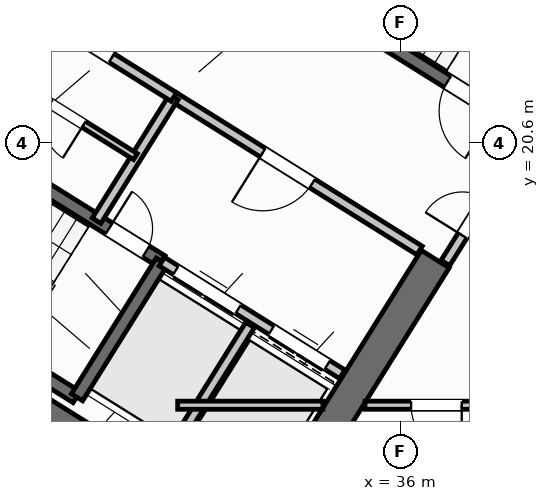
"""IFC4 building model, lengths in metres.
Left out: names, types, materials, properties, quantities, classifications, styles, units other than length and angle.
Written with IfcOpenShell. Run it as: python <this file> out.ifc"""

import sys

from ifc_helpers import new_model, si_unit, direction, frame, frame_2d, origin, place, context, subcontext, project, spatial, rectangle, extrude, source, transform, mapped, element, fill, save


model = new_model("IFC4")
c1 = context("Model", 3, precision=1e-05, world=origin(), true_north=direction((0.0, 1.0)))
c2 = subcontext(c1, "Body", "Model", "MODEL_VIEW")
j1 = project(units=[si_unit("LENGTHUNIT", "METRE"), si_unit("PLANEANGLEUNIT", "RADIAN")], contexts=[c1])
p1 = place(None, origin())
s1 = spatial("IfcSite", under=j1, at=p1, CompositionType="ELEMENT")
p2 = place(p1, origin())
s2 = spatial("IfcBuilding", under=s1, at=p2, CompositionType="ELEMENT")
p3 = place(p2, frame((0.0, 0.0, 42.0)))
s3 = spatial("IfcBuildingStorey", under=s2, at=p3, CompositionType="ELEMENT", Elevation=42.0)
p4 = place(p3, frame((33.409, 12.45, 0.0), z_axis=(0.0, 0.0, 1.0), x_axis=(-0.848051132073, 0.529914405721, 0.0)))
e1 = element("IfcWall", 1, at=p4, inside=s3, PredefinedType="SHEAR", context=c2, shape_type="SweptSolid", body=[
    extrude(rectangle(XDim=13.24, YDim=0.65, at=frame_2d((6.62, 0.0))), origin(), (0.0, 0.0, 1.0), 3.35),
])
p5 = place(p3, frame((36.683, 18.304, 0.0), z_axis=(0.0, 0.0, 1.0), x_axis=(-0.529899109053, -0.848060690178, 0.0)))
e2 = element("IfcWall", 2, at=p5, inside=s3, PredefinedType="SHEAR", context=c2, shape_type="SweptSolid", body=[
    extrude(rectangle(XDim=6.375, YDim=0.65, at=frame_2d((3.188, 0.0))), origin(), (0.0, 0.0, 1.0), 3.35),
])
p6 = place(p3, frame((29.268, 6.429, 0.0), z_axis=(0.0, 0.0, 1.0), x_axis=(-0.848049971435, 0.529916263149, 0.0)))
e3 = element("IfcWall", 3, at=p6, inside=s3, PredefinedType="STANDARD", context=c2, shape_type="SweptSolid", body=[
    extrude(rectangle(XDim=31.588, YDim=0.32, at=frame_2d((15.794, 0.0))), origin(), (0.0, 0.0, 1.0), 3.35),
])
p7 = place(p6, frame((16.362, 0.0, 0.0)))
e4 = element("IfcOpeningElement", 4, at=p7, cuts=e3, PredefinedType="OPENING", context=c2, shape_type="SweptSolid", body=[
    extrude(rectangle(XDim=1.2, YDim=2.15, at=frame_2d((0.6, 1.075))), frame((0.0, 0.17, 0.0), z_axis=(0.0, -1.0, 0.0), x_axis=(1.0, 0.0, 0.0)), (0.0, 0.0, 1.0), 0.34),
])
p8 = place(p6, frame((2.989, 0.0, 0.8)))
e5 = element("IfcOpeningElement", 5, at=p8, cuts=e3, PredefinedType="OPENING", context=c2, shape_type="SweptSolid", body=[
    extrude(rectangle(XDim=2.1, YDim=1.55, at=frame_2d((1.05, 0.775))), frame((0.0, 0.17, 0.0), z_axis=(0.0, -1.0, 0.0), x_axis=(1.0, 0.0, 0.0)), (0.0, 0.0, 1.0), 0.34),
])
p9 = place(p6, frame((8.359, 0.0, 0.8)))
e6 = element("IfcOpeningElement", 6, at=p9, cuts=e3, PredefinedType="OPENING", context=c2, shape_type="SweptSolid", body=[
    extrude(rectangle(XDim=2.1, YDim=1.55, at=frame_2d((1.05, 0.775))), frame((0.0, 0.17, 0.0), z_axis=(0.0, -1.0, 0.0), x_axis=(1.0, 0.0, 0.0)), (0.0, 0.0, 1.0), 0.34),
])
p10 = place(p6, frame((13.284, 0.0, 0.95)))
e7 = element("IfcOpeningElement", 7, at=p10, cuts=e3, PredefinedType="OPENING", context=c2, shape_type="SweptSolid", body=[
    extrude(rectangle(XDim=1.2, YDim=1.4, at=frame_2d((0.6, 0.7))), frame((0.0, 0.17, 0.0), z_axis=(0.0, -1.0, 0.0), x_axis=(1.0, 0.0, 0.0)), (0.0, 0.0, 1.0), 0.34),
])
p11 = place(p6, frame((20.39, 0.0, 0.95)))
e8 = element("IfcOpeningElement", 8, at=p11, cuts=e3, PredefinedType="OPENING", context=c2, shape_type="SweptSolid", body=[
    extrude(rectangle(XDim=1.2, YDim=1.4, at=frame_2d((0.6, 0.7))), frame((0.0, 0.17, 0.0), z_axis=(0.0, -1.0, 0.0), x_axis=(1.0, 0.0, 0.0)), (0.0, 0.0, 1.0), 0.34),
])
p12 = place(p6, frame((23.715, 0.0, 1.0)))
e9 = element("IfcOpeningElement", 9, at=p12, cuts=e3, PredefinedType="OPENING", context=c2, shape_type="SweptSolid", body=[
    extrude(rectangle(XDim=0.9, YDim=1.25, at=frame_2d((0.45, 0.625))), frame((0.0, 0.17, 0.0), z_axis=(0.0, -1.0, 0.0), x_axis=(1.0, 0.0, 0.0)), (0.0, 0.0, 1.0), 0.34),
])
p13 = place(p6, frame((27.481, 0.0, 0.8)))
e10 = element("IfcOpeningElement", 10, at=p13, cuts=e3, PredefinedType="OPENING", context=c2, shape_type="SweptSolid", body=[
    extrude(rectangle(XDim=2.1, YDim=1.55, at=frame_2d((1.05, 0.775))), frame((0.0, 0.17, 0.0), z_axis=(0.0, -1.0, 0.0), x_axis=(1.0, 0.0, 0.0)), (0.0, 0.0, 1.0), 0.34),
])
p14 = place(p3, frame((29.605, 15.581, 0.0), z_axis=(0.0, 0.0, 1.0), x_axis=(-0.848036911448, 0.529937163087, 0.0)))
e11 = element("IfcWall", 11, at=p14, inside=s3, PredefinedType="SHEAR", context=c2, shape_type="SweptSolid", body=[
    extrude(rectangle(XDim=7.46, YDim=0.26, at=frame_2d((3.73, 0.0))), origin(), (0.0, 0.0, 1.0), 3.35),
])
p15 = place(p3, frame((31.28, 18.261, 0.0), z_axis=(0.0, 0.0, 1.0), x_axis=(-0.848051618787, 0.529913626805, 0.0)))
e12 = element("IfcWall", 12, at=p15, inside=s3, PredefinedType="SHEAR", context=c2, shape_type="SweptSolid", body=[
    extrude(rectangle(XDim=7.46, YDim=0.26, at=frame_2d((3.73, 0.0))), origin(), (0.0, 0.0, 1.0), 3.35),
])
p16 = place(p15, frame((0.36, 0.0, 0.0)))
e13 = element("IfcOpeningElement", 13, at=p16, cuts=e12, PredefinedType="OPENING", context=c2, shape_type="SweptSolid", body=[
    extrude(rectangle(XDim=0.86, YDim=2.05, at=frame_2d((0.43, 1.025))), frame((0.0, 0.14, 0.0), z_axis=(0.0, -1.0, 0.0), x_axis=(1.0, 0.0, 0.0)), (0.0, 0.0, 1.0), 0.28),
])
p17 = place(p3, frame((31.288, 18.256, 0.0), z_axis=(0.0, 0.0, 1.0), x_axis=(-0.529943379326, -0.848033026897, 0.0)))
e14 = element("IfcWall", 14, at=p17, inside=s3, PredefinedType="SHEAR", context=c2, shape_type="SweptSolid", body=[
    extrude(rectangle(XDim=3.16, YDim=0.26, at=frame_2d((1.58, 0.0))), origin(), (0.0, 0.0, 1.0), 3.35),
])
p18 = place(p3, frame((38.046, 21.108, 0.0), z_axis=(0.0, 0.0, 1.0), x_axis=(-0.848054434086, 0.529909121291, 0.0)))
e15 = element("IfcWall", 15, at=p18, inside=s3, PredefinedType="SHEAR", context=c2, shape_type="SweptSolid", body=[
    extrude(rectangle(XDim=7.33, YDim=0.26, at=frame_2d((3.665, 0.0))), origin(), (0.0, 0.0, 1.0), 3.35),
])
p19 = place(p18, frame((0.22, 0.0, 0.0)))
e16 = element("IfcOpeningElement", 16, at=p19, cuts=e15, PredefinedType="OPENING", context=c2, shape_type="SweptSolid", body=[
    extrude(rectangle(XDim=1.1, YDim=2.1, at=frame_2d((0.55, 1.05))), frame((0.0, 0.14, 0.0), z_axis=(0.0, -1.0, 0.0), x_axis=(1.0, 0.0, 0.0)), (0.0, 0.0, 1.0), 0.28),
])
p20 = place(p3, frame((34.848, 16.031, 0.0), z_axis=(0.0, 0.0, 1.0), x_axis=(-0.848044042236, 0.529925751807, 0.0)))
e17 = element("IfcWall", 17, at=p20, inside=s3, PredefinedType="STANDARD", context=c2, shape_type="SweptSolid", body=[
    extrude(rectangle(XDim=4.198, YDim=0.2, at=frame_2d((2.099, 0.0))), origin(), (0.0, 0.0, 1.0), 3.34),
])
p21 = place(p20, frame((0.348, 0.0, 0.0)))
e18 = element("IfcOpeningElement", 18, at=p21, cuts=e17, PredefinedType="OPENING", context=c2, shape_type="SweptSolid", body=[
    extrude(rectangle(XDim=1.3, YDim=2.2, at=frame_2d((0.65, 1.1))), frame((0.0, 0.11, 0.0), z_axis=(0.0, -1.0, 0.0), x_axis=(1.0, 0.0, 0.0)), (0.0, 0.0, 1.0), 0.22),
])
p22 = place(p20, frame((2.423, 0.0, 0.0)))
e19 = element("IfcOpeningElement", 19, at=p22, cuts=e17, PredefinedType="OPENING", context=c2, shape_type="SweptSolid", body=[
    extrude(rectangle(XDim=1.45, YDim=2.25, at=frame_2d((0.725, 1.125))), frame((0.0, 0.11, 0.0), z_axis=(0.0, -1.0, 0.0), x_axis=(1.0, 0.0, 0.0)), (0.0, 0.0, 1.0), 0.22),
])
p23 = place(p3, frame((36.374, 18.474, 0.0), z_axis=(0.0, 0.0, 1.0), x_axis=(-0.848051071577, 0.529914502535, 0.0)))
e20 = element("IfcWall", 20, at=p23, inside=s3, PredefinedType="STANDARD", context=c2, shape_type="SweptSolid", body=[
    extrude(rectangle(XDim=5.718, YDim=0.2, at=frame_2d((2.859, 0.0))), origin(), (0.0, 0.0, 1.0), 3.34),
])
p24 = place(p23, frame((2.498, 0.0, 0.0)))
e21 = element("IfcOpeningElement", 21, at=p24, cuts=e20, PredefinedType="OPENING", context=c2, shape_type="SweptSolid", body=[
    extrude(rectangle(XDim=1.15, YDim=2.1, at=frame_2d((0.575, 1.05))), frame((0.0, 0.11, 0.0), z_axis=(0.0, -1.0, 0.0), x_axis=(1.0, 0.0, 0.0)), (0.0, 0.0, 1.0), 0.22),
])
p25 = place(p3, frame((33.029, 17.003, 0.0), z_axis=(0.0, 0.0, 1.0), x_axis=(-0.529916267533, -0.848049968695, 0.0)))
e22 = element("IfcWall", 22, at=p25, inside=s3, PredefinedType="STANDARD", context=c2, shape_type="SweptSolid", body=[
    extrude(rectangle(XDim=2.92, YDim=0.2, at=frame_2d((1.46, 0.0))), origin(), (0.0, 0.0, 1.0), 3.34),
])
p26 = place(p3, frame((31.525, 21.504, 0.0), z_axis=(0.0, 0.0, 1.0), x_axis=(-0.529907497854, -0.848055448493, 0.0)))
e23 = element("IfcWall", 23, at=p26, inside=s3, PredefinedType="STANDARD", context=c2, shape_type="SweptSolid", body=[
    extrude(rectangle(XDim=2.88, YDim=0.2, at=frame_2d((1.44, 0.0))), origin(), (0.0, 0.0, 1.0), 3.34),
])
p27 = place(p3, frame((31.525, 21.504, 0.0), z_axis=(0.0, 0.0, 1.0), x_axis=(-0.848044998614, 0.529924221305, 0.0)))
e24 = element("IfcWall", 24, at=p27, inside=s3, PredefinedType="STANDARD", context=c2, shape_type="SweptSolid", body=[
    extrude(rectangle(XDim=6.168, YDim=0.2, at=frame_2d((3.084, 0.0))), origin(), (0.0, 0.0, 1.0), 3.34),
])
p28 = place(p27, frame((4.4, 0.0, 0.0)))
e25 = element("IfcOpeningElement", 25, at=p28, cuts=e24, PredefinedType="OPENING", context=c2, shape_type="SweptSolid", body=[
    extrude(rectangle(XDim=0.86, YDim=2.05, at=frame_2d((0.43, 1.025))), frame((0.0, 0.11, 0.0), z_axis=(0.0, -1.0, 0.0), x_axis=(1.0, 0.0, 0.0)), (0.0, 0.0, 1.0), 0.22),
])
p29 = place(p27, frame((1.45, 0.0, 0.0)))
e26 = element("IfcOpeningElement", 26, at=p29, cuts=e24, PredefinedType="OPENING", context=c2, shape_type="SweptSolid", body=[
    extrude(rectangle(XDim=0.86, YDim=2.05, at=frame_2d((0.43, 1.025))), frame((0.0, 0.11, 0.0), z_axis=(0.0, -1.0, 0.0), x_axis=(1.0, 0.0, 0.0)), (0.0, 0.0, 1.0), 0.22),
])
p30 = place(p3, frame((30.766, 20.327, 0.0), z_axis=(0.0, 0.0, 1.0), x_axis=(-0.848052663127, 0.529911955482, 0.0)))
e27 = element("IfcWall", 27, at=p30, inside=s3, PredefinedType="PLUMBINGWALL", context=c2, shape_type="SweptSolid", body=[
    extrude(rectangle(XDim=3.28, YDim=0.14, at=frame_2d((1.64, 0.0))), origin(), (0.0, 0.0, 1.0), 3.34),
])
p31 = place(p30, frame((1.2, 0.0, 0.0)))
e28 = element("IfcOpeningElement", 28, at=p31, cuts=e27, PredefinedType="OPENING", context=c2, shape_type="SweptSolid", body=[
    extrude(rectangle(XDim=0.78, YDim=2.05, at=frame_2d((0.39, 1.025))), frame((0.0, 0.08, 0.0), z_axis=(0.0, -1.0, 0.0), x_axis=(1.0, 0.0, 0.0)), (0.0, 0.0, 1.0), 0.16),
])
p32 = place(p3, frame((32.164, 10.374, 0.0), z_axis=(0.0, 0.0, 1.0), x_axis=(-0.848044107957, 0.529925646633, 0.0)))
e29 = element("IfcWall", 29, at=p32, inside=s3, PredefinedType="PARTITIONING", context=c2, shape_type="SweptSolid", body=[
    extrude(rectangle(XDim=15.57, YDim=0.16, at=frame_2d((7.785, 0.0))), origin(), (0.0, 0.0, 1.0), 3.34),
])
p33 = place(p32, frame((10.83, 0.0, 0.0)))
e30 = element("IfcOpeningElement", 30, at=p33, cuts=e29, PredefinedType="OPENING", context=c2, shape_type="SweptSolid", body=[
    extrude(rectangle(XDim=1.0, YDim=2.1, at=frame_2d((0.5, 1.05))), frame((0.0, 0.09, 0.0), z_axis=(0.0, -1.0, 0.0), x_axis=(1.0, 0.0, 0.0)), (0.0, 0.0, 1.0), 0.18),
])
p34 = place(p3, frame((29.72, 8.859, 0.0), z_axis=(0.0, 0.0, 1.0), x_axis=(-0.848049134363, 0.529917602752, 0.0)))
e31 = element("IfcWall", 31, at=p34, inside=s3, PredefinedType="PLUMBINGWALL", context=c2, shape_type="SweptSolid", body=[
    extrude(rectangle(XDim=14.3, YDim=0.14, at=frame_2d((7.15, 0.0))), origin(), (0.0, 0.0, 1.0), 3.34),
])
p35 = place(p34, frame((9.57, 0.0, 0.0)))
e32 = element("IfcOpeningElement", 32, at=p35, cuts=e31, PredefinedType="OPENING", context=c2, shape_type="SweptSolid", body=[
    extrude(rectangle(XDim=0.92, YDim=2.08, at=frame_2d((0.46, 1.04))), frame((0.0, 0.08, 0.0), z_axis=(0.0, -1.0, 0.0), x_axis=(1.0, 0.0, 0.0)), (0.0, 0.0, 1.0), 0.16),
])
p36 = place(p3, frame((38.451, 20.737, 0.0), z_axis=(0.0, 0.0, 1.0), x_axis=(-0.529924799939, -0.848044637038, 0.0)))
e33 = element("IfcWall", 33, at=p36, inside=s3, PredefinedType="STANDARD", context=c2, shape_type="SweptSolid", body=[
    extrude(rectangle(XDim=2.96, YDim=0.2, at=frame_2d((1.48, 0.0))), origin(), (0.0, 0.0, 1.0), 3.34),
])
p37 = place(p36, frame((1.46, 0.0, 0.0)))
e34 = element("IfcOpeningElement", 34, at=p37, cuts=e33, PredefinedType="OPENING", context=c2, shape_type="SweptSolid", body=[
    extrude(rectangle(XDim=0.86, YDim=2.05, at=frame_2d((0.43, 1.025))), frame((0.0, 0.11, 0.0), z_axis=(0.0, -1.0, 0.0), x_axis=(1.0, 0.0, 0.0)), (0.0, 0.0, 1.0), 0.22),
])
p38 = place(p3, frame((31.6, 15.42, 0.0), z_axis=(0.0, 0.0, 1.0), x_axis=(1.0, 0.0, 0.0)))
e35 = element("IfcWall", 35, at=p38, inside=s3, PredefinedType="PARTITIONING", context=c2, shape_type="SweptSolid", body=[
    extrude(rectangle(XDim=2.866, YDim=0.16, at=frame_2d((1.433, 0.0))), origin(), (0.0, 0.0, 1.0), 3.34),
])
p39 = place(p3, frame((35.296, 15.42, 0.0), z_axis=(0.0, 0.0, 1.0), x_axis=(1.0, 0.0, 0.0)))
e36 = element("IfcWall", 36, at=p39, inside=s3, PredefinedType="PARTITIONING", context=c2, shape_type="SweptSolid", body=[
    extrude(rectangle(XDim=15.311, YDim=0.16, at=frame_2d((7.655, 0.0))), origin(), (0.0, 0.0, 1.0), 3.34),
])
p40 = place(p39, frame((0.91, 0.0, 0.0)))
e37 = element("IfcOpeningElement", 37, at=p40, cuts=e36, PredefinedType="OPENING", context=c2, shape_type="SweptSolid", body=[
    extrude(rectangle(XDim=1.0, YDim=2.1, at=frame_2d((0.5, 1.05))), frame((0.0, 0.09, 0.0), z_axis=(0.0, -1.0, 0.0), x_axis=(1.0, 0.0, 0.0)), (0.0, 0.0, 1.0), 0.18),
])
p41 = place(p39, frame((8.74, 0.0, 0.0)))
e38 = element("IfcOpeningElement", 38, at=p41, cuts=e36, PredefinedType="OPENING", context=c2, shape_type="SweptSolid", body=[
    extrude(rectangle(XDim=1.0, YDim=2.1, at=frame_2d((0.5, 1.05))), frame((0.0, 0.09, 0.0), z_axis=(0.0, -1.0, 0.0), x_axis=(1.0, 0.0, 0.0)), (0.0, 0.0, 1.0), 0.18),
])
m1 = source(origin(), c2, "Body", "SweptSolid", [
    extrude(rectangle(XDim=0.86, YDim=2.05, at=frame_2d((0.43, 1.025))), frame((0.0, 0.025, 0.0), z_axis=(0.0, -1.0, 0.0), x_axis=(1.0, 0.0, 0.0)), (0.0, 0.0, 1.0), 0.05),
])
p42 = place(p16, frame((0.86, 0.0, 0.0), z_axis=(0.0, 0.0, 1.0), x_axis=(-1.0, 0.0, 0.0)))
e39 = element("IfcDoor", 39, at=p42, inside=s3, OperationType="SINGLE_SWING_LEFT", PredefinedType="DOOR", context=c2, shape_type="MappedRepresentation", body=[
    mapped(m1, transform((0.0, 0.0, 0.0), scale=1.0)),
])
fill(e13, e39)
m2 = source(origin(), c2, "Body", "SweptSolid", [
    extrude(rectangle(XDim=1.1, YDim=2.1, at=frame_2d((0.55, 1.05))), frame((0.0, 0.025, 0.0), z_axis=(0.0, -1.0, 0.0), x_axis=(1.0, 0.0, 0.0)), (0.0, 0.0, 1.0), 0.05),
])
p43 = place(p19, origin())
e40 = element("IfcDoor", 40, at=p43, inside=s3, OperationType="SINGLE_SWING_LEFT", PredefinedType="DOOR", context=c2, shape_type="MappedRepresentation", body=[
    mapped(m2, transform((0.0, 0.0, 0.0), scale=1.0)),
])
fill(e16, e40)
m3 = source(origin(), c2, "Body", "SweptSolid", [
    extrude(rectangle(XDim=1.15, YDim=2.1, at=frame_2d((0.575, 1.05))), frame((0.0, 0.025, 0.0), z_axis=(0.0, -1.0, 0.0), x_axis=(1.0, 0.0, 0.0)), (0.0, 0.0, 1.0), 0.05),
])
p44 = place(p24, origin())
e41 = element("IfcDoor", 41, at=p44, inside=s3, OperationType="SINGLE_SWING_RIGHT", PredefinedType="DOOR", context=c2, shape_type="MappedRepresentation", body=[
    mapped(m3, transform((0.0, 0.0, 0.0), scale=1.0)),
])
fill(e21, e41)
m4 = source(origin(), c2, "Body", "SweptSolid", [
    extrude(rectangle(XDim=1.3, YDim=2.2, at=frame_2d((0.65, 1.1))), frame((0.0, 0.025, 0.0), z_axis=(0.0, -1.0, 0.0), x_axis=(1.0, 0.0, 0.0)), (0.0, 0.0, 1.0), 0.05),
])
p45 = place(p21, origin())
e42 = element("IfcDoor", 42, at=p45, inside=s3, OperationType="DOUBLE_DOOR_SLIDING", PredefinedType="DOOR", context=c2, shape_type="MappedRepresentation", body=[
    mapped(m4, transform((0.0, 0.0, 0.0), scale=1.0)),
])
fill(e18, e42)
m5 = source(origin(), c2, "Body", "SweptSolid", [
    extrude(rectangle(XDim=1.45, YDim=2.25, at=frame_2d((0.725, 1.125))), frame((0.0, 0.025, 0.0), z_axis=(0.0, -1.0, 0.0), x_axis=(1.0, 0.0, 0.0)), (0.0, 0.0, 1.0), 0.05),
])
p46 = place(p22, origin())
e43 = element("IfcDoor", 43, at=p46, inside=s3, OperationType="DOUBLE_DOOR_SLIDING", PredefinedType="DOOR", context=c2, shape_type="MappedRepresentation", body=[
    mapped(m5, transform((0.0, 0.0, 0.0), scale=1.0)),
])
fill(e19, e43)
p47 = place(p29, frame((0.86, 0.0, 0.0), z_axis=(0.0, 0.0, 1.0), x_axis=(-1.0, 0.0, 0.0)))
e44 = element("IfcDoor", 44, at=p47, inside=s3, OperationType="SINGLE_SWING_RIGHT", PredefinedType="DOOR", context=c2, shape_type="MappedRepresentation", body=[
    mapped(m1, transform((0.0, 0.0, 0.0), scale=1.0)),
])
fill(e26, e44)
m6 = source(origin(), c2, "Body", "SweptSolid", [
    extrude(rectangle(XDim=0.78, YDim=2.05, at=frame_2d((0.39, 1.025))), frame((0.0, 0.025, 0.0), z_axis=(0.0, -1.0, 0.0), x_axis=(1.0, 0.0, 0.0)), (0.0, 0.0, 1.0), 0.05),
])
p48 = place(p31, origin())
e45 = element("IfcDoor", 45, at=p48, inside=s3, OperationType="SINGLE_SWING_LEFT", PredefinedType="DOOR", context=c2, shape_type="MappedRepresentation", body=[
    mapped(m6, transform((0.0, 0.0, 0.0), scale=1.0)),
])
fill(e28, e45)
p49 = place(p37, frame((0.86, 0.0, 0.0), z_axis=(0.0, 0.0, 1.0), x_axis=(-1.0, 0.0, 0.0)))
e46 = element("IfcDoor", 46, at=p49, inside=s3, OperationType="SINGLE_SWING_LEFT", PredefinedType="DOOR", context=c2, shape_type="MappedRepresentation", body=[
    mapped(m1, transform((0.0, 0.0, 0.0), scale=1.0)),
])
fill(e34, e46)
m7 = source(origin(), c2, "Body", "SweptSolid", [
    extrude(rectangle(XDim=1.0, YDim=2.1, at=frame_2d((0.5, 1.05))), frame((0.0, 0.025, 0.0), z_axis=(0.0, -1.0, 0.0), x_axis=(1.0, 0.0, 0.0)), (0.0, 0.0, 1.0), 0.05),
])
p50 = place(p40, frame((1.0, 0.0, 0.0), z_axis=(0.0, 0.0, 1.0), x_axis=(-1.0, 0.0, 0.0)))
e47 = element("IfcDoor", 47, at=p50, inside=s3, OperationType="SINGLE_SWING_LEFT", PredefinedType="DOOR", context=c2, shape_type="MappedRepresentation", body=[
    mapped(m7, transform((0.0, 0.0, 0.0), scale=1.0)),
])
fill(e37, e47)
save(model, sys.argv[1])
